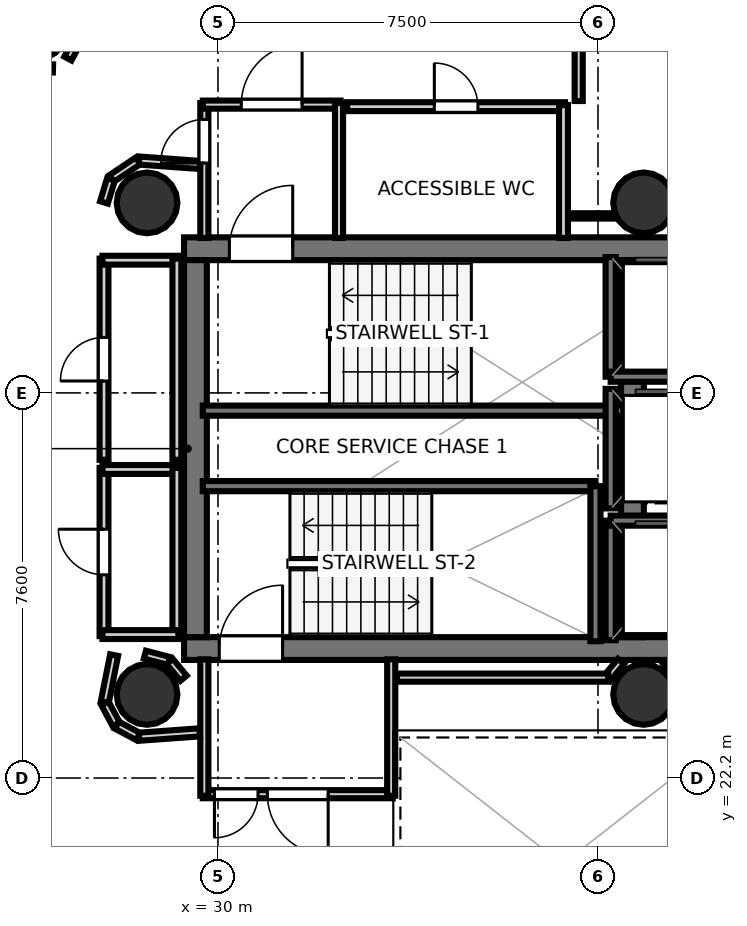
"""IFC4 building model, lengths in metres.
Left out: names, types, materials, properties, quantities, classifications, styles, units other than length and angle.
Written with IfcOpenShell. Run it as: python <this file> out.ifc"""

import sys

from ifc_helpers import new_model, si_unit, direction, frame, frame_2d, origin, origin_2d, place, context, subcontext, project, spatial, rectangle, hollow_circle, extrude, element, fill, save


model = new_model("IFC4")
c1 = context("Model", 3, precision=1e-05, world=origin(), true_north=direction((0.0, 1.0)))
c2 = subcontext(c1, "Body", "Model", "MODEL_VIEW")
j1 = project(units=[si_unit("LENGTHUNIT", "METRE"), si_unit("PLANEANGLEUNIT", "RADIAN")], contexts=[c1])
p1 = place(None, origin())
s1 = spatial("IfcSite", under=j1, at=p1, CompositionType="ELEMENT")
p2 = place(p1, origin())
s2 = spatial("IfcBuilding", under=s1, at=p2, CompositionType="ELEMENT")
p3 = place(p2, frame((0.0, 0.0, 200.3)))
s3 = spatial("IfcBuildingStorey", under=s2, at=p3, CompositionType="ELEMENT", Elevation=200.3)
p4 = place(p3, frame((29.33, 32.645, 0.0), z_axis=(0.0, 0.0, 1.0), x_axis=(1.0, 0.0, 0.0)))
e1 = element("IfcWall", 1, at=p4, inside=s3, PredefinedType="SHEAR", context=c2, shape_type="SweptSolid", body=[
    extrude(rectangle(XDim=10.52, YDim=0.45, at=frame_2d((5.26, 0.0))), origin(), (0.0, 0.0, 1.0), 3.52),
])
p5 = place(p4, frame((0.895, 0.0, 0.0)))
e2 = element("IfcOpeningElement", 2, at=p5, cuts=e1, PredefinedType="OPENING", context=c2, shape_type="SweptSolid", body=[
    extrude(rectangle(XDim=1.25, YDim=2.15, at=frame_2d((0.625, 1.075))), frame((0.0, 0.235, 0.0), z_axis=(0.0, -1.0, 0.0), x_axis=(1.0, 0.0, 0.0)), (0.0, 0.0, 1.0), 0.47),
])
p6 = place(p3, frame((29.33, 24.755, 0.0), z_axis=(0.0, 0.0, 1.0), x_axis=(1.0, 0.0, 0.0)))
e3 = element("IfcWall", 3, at=p6, inside=s3, PredefinedType="SHEAR", context=c2, shape_type="SweptSolid", body=[
    extrude(rectangle(XDim=10.52, YDim=0.45, at=frame_2d((5.26, 0.0))), origin(), (0.0, 0.0, 1.0), 3.52),
])
p7 = place(p6, frame((0.695, 0.0, 0.0)))
e4 = element("IfcOpeningElement", 4, at=p7, cuts=e3, PredefinedType="OPENING", context=c2, shape_type="SweptSolid", body=[
    extrude(rectangle(XDim=1.25, YDim=2.15, at=frame_2d((0.625, 1.075))), frame((0.0, 0.235, 0.0), z_axis=(0.0, -1.0, 0.0), x_axis=(1.0, 0.0, 0.0)), (0.0, 0.0, 1.0), 0.47),
])
for number, where, z_axis, x_axis in (
    (5, (29.555, 24.98, 0.0), (0.0, 0.0, 1.0), (0.0, 1.0, 0.0)),
    (6, (38.18, 24.98, 0.0), (0.0, 0.0, 1.0), (0.0, 1.0, 0.0)),
):
    element("IfcWall", number, at=place(p3, frame(where, z_axis=z_axis, x_axis=x_axis)), inside=s3, PredefinedType="SHEAR", context=c2, shape_type="SweptSolid", body=[
        extrude(rectangle(XDim=7.44, YDim=0.45, at=frame_2d((3.72, 0.0))), origin(), (0.0, 0.0, 1.0), 3.52),
    ])
for number, where, z_axis, x_axis in (
    (7, (28.6, 33.55, 0.0), (0.0, 0.0, 1.0), (1.0, 0.0, 0.0)),
    (8, (28.6, 23.85, 0.0), (0.0, 0.0, 1.0), (1.0, 0.0, 0.0)),
    (9, (38.4, 33.55, 0.0), (0.0, 0.0, 1.0), (1.0, 0.0, 0.0)),
    (10, (38.4, 23.85, 0.0), (0.0, 0.0, 1.0), (1.0, 0.0, 0.0)),
    (11, (26.431, 36.992, 0.0), (0.0, 0.0, 1.0), (1.0, 0.0, 0.0)),
):
    element("IfcColumn", number, at=place(p3, frame(where, z_axis=z_axis, x_axis=x_axis)), inside=s3, PredefinedType="COLUMN", context=c2, shape_type="SweptSolid", body=[
        extrude(hollow_circle(Radius=0.6, WallThickness=0.03, at=origin_2d()), origin(), (0.0, 0.0, 1.0), 3.7),
    ])
p8 = place(p3, frame((29.7, 29.45, 0.0), z_axis=(0.0, 0.0, 1.0), x_axis=(1.0, 0.0, 0.0)))
e12 = element("IfcWall", 12, at=p8, inside=s3, PredefinedType="SOLIDWALL", context=c2, shape_type="SweptSolid", body=[
    extrude(rectangle(XDim=8.3, YDim=0.2, at=frame_2d((4.15, 0.0))), origin(), (0.0, 0.0, 1.0), 3.52),
])
p9 = place(p3, frame((29.7, 27.96, 0.0), z_axis=(0.0, 0.0, 1.0), x_axis=(1.0, 0.0, 0.0)))
e13 = element("IfcWall", 13, at=p9, inside=s3, PredefinedType="SOLIDWALL", context=c2, shape_type="SweptSolid", body=[
    extrude(rectangle(XDim=7.75, YDim=0.2, at=frame_2d((3.875, 0.0))), origin(), (0.0, 0.0, 1.0), 3.52),
])
p10 = place(p3, frame((37.45, 24.9, 0.0), z_axis=(0.0, 0.0, 1.0), x_axis=(0.0, 1.0, 0.0)))
e14 = element("IfcWall", 14, at=p10, inside=s3, PredefinedType="SOLIDWALL", context=c2, shape_type="SweptSolid", body=[
    extrude(rectangle(XDim=3.06, YDim=0.2, at=frame_2d((1.53, 0.0))), origin(), (0.0, 0.0, 1.0), 3.52),
])
p11 = place(p3, frame((37.75, 30.12, 0.0), z_axis=(0.0, 0.0, 1.0), x_axis=(0.0, 1.0, 0.0)))
e15 = element("IfcWall", 15, at=p11, inside=s3, PredefinedType="SOLIDWALL", context=c2, shape_type="SweptSolid", body=[
    extrude(rectangle(XDim=2.36, YDim=0.2, at=frame_2d((1.18, 0.0))), origin(), (0.0, 0.0, 1.0), 3.52),
])
p12 = place(p3, frame((37.75, 30.12, 0.0), z_axis=(0.0, 0.0, 1.0), x_axis=(1.0, 0.0, 0.0)))
e16 = element("IfcWall", 16, at=p12, inside=s3, PredefinedType="SOLIDWALL", context=c2, shape_type="SweptSolid", body=[
    extrude(rectangle(XDim=2.1, YDim=0.2, at=frame_2d((1.05, 0.0))), origin(), (0.0, 0.0, 1.0), 3.52),
])
p13 = place(p3, frame((37.75, 24.92, 0.0), z_axis=(0.0, 0.0, 1.0), x_axis=(0.0, 1.0, 0.0)))
e17 = element("IfcWall", 17, at=p13, inside=s3, PredefinedType="SOLIDWALL", context=c2, shape_type="SweptSolid", body=[
    extrude(rectangle(XDim=2.36, YDim=0.2, at=frame_2d((1.18, 0.0))), origin(), (0.0, 0.0, 1.0), 3.52),
])
p14 = place(p3, frame((37.75, 27.28, 0.0), z_axis=(0.0, 0.0, 1.0), x_axis=(1.0, 0.0, 0.0)))
e18 = element("IfcWall", 18, at=p14, inside=s3, PredefinedType="SOLIDWALL", context=c2, shape_type="SweptSolid", body=[
    extrude(rectangle(XDim=2.1, YDim=0.2, at=frame_2d((1.05, 0.0))), origin(), (0.0, 0.0, 1.0), 3.52),
])
p15 = place(p3, frame((37.75, 27.52, 0.0), z_axis=(0.0, 0.0, 1.0), x_axis=(0.0, 1.0, 0.0)))
e19 = element("IfcWall", 19, at=p15, inside=s3, PredefinedType="SOLIDWALL", context=c2, shape_type="SweptSolid", body=[
    extrude(rectangle(XDim=2.36, YDim=0.2, at=frame_2d((1.18, 0.0))), origin(), (0.0, 0.0, 1.0), 3.52),
])
p16 = place(p3, frame((29.731, 32.858, 0.0), z_axis=(0.0, 0.0, 1.0), x_axis=(0.0, 1.0, 0.0)))
e20 = element("IfcWall", 20, at=p16, inside=s3, PredefinedType="PARTITIONING", context=c2, shape_type="SweptSolid", body=[
    extrude(rectangle(XDim=2.662, YDim=0.16, at=frame_2d((1.331, 0.0))), origin(), (0.0, 0.0, 1.0), 2.84),
])
p17 = place(p16, frame((1.478, 0.0, 0.0)))
e21 = element("IfcOpeningElement", 21, at=p17, cuts=e20, PredefinedType="OPENING", context=c2, shape_type="SweptSolid", body=[
    extrude(rectangle(XDim=0.86, YDim=2.05, at=frame_2d((0.43, 1.025))), frame((0.0, 0.09, 0.0), z_axis=(0.0, -1.0, 0.0), x_axis=(1.0, 0.0, 0.0)), (0.0, 0.0, 1.0), 0.18),
])
p18 = place(p3, frame((29.7, 35.489, 0.0), z_axis=(0.0, 0.0, 1.0), x_axis=(1.0, 0.0, 0.0)))
e22 = element("IfcWall", 22, at=p18, inside=s3, PredefinedType="PARTITIONING", context=c2, shape_type="SweptSolid", body=[
    extrude(rectangle(XDim=2.72, YDim=0.16, at=frame_2d((1.36, 0.0))), origin(), (0.0, 0.0, 1.0), 2.84),
])
p19 = place(p18, frame((0.76, 0.0, 0.0)))
e23 = element("IfcOpeningElement", 23, at=p19, cuts=e22, PredefinedType="OPENING", context=c2, shape_type="SweptSolid", body=[
    extrude(rectangle(XDim=1.2, YDim=2.15, at=frame_2d((0.6, 1.075))), frame((0.0, 0.09, 0.0), z_axis=(0.0, -1.0, 0.0), x_axis=(1.0, 0.0, 0.0)), (0.0, 0.0, 1.0), 0.18),
])
p20 = place(p3, frame((32.389, 35.52, 0.0), z_axis=(0.0, 0.0, 1.0), x_axis=(0.0, -1.0, 0.0)))
e24 = element("IfcWall", 24, at=p20, inside=s3, PredefinedType="PARTITIONING", context=c2, shape_type="SweptSolid", body=[
    extrude(rectangle(XDim=2.662, YDim=0.16, at=frame_2d((1.331, 0.0))), origin(), (0.0, 0.0, 1.0), 2.84),
])
p21 = place(p3, frame((33.45, 21.881, 0.0), z_axis=(0.0, 0.0, 1.0), x_axis=(-1.0, 0.0, 0.0)))
e25 = element("IfcWall", 25, at=p21, inside=s3, PredefinedType="PARTITIONING", context=c2, shape_type="SweptSolid", body=[
    extrude(rectangle(XDim=3.75, YDim=0.16, at=frame_2d((1.875, 0.0))), origin(), (0.0, 0.0, 1.0), 2.84),
])
p22 = place(p21, frame((1.275, 0.0, 0.0)))
e26 = element("IfcOpeningElement", 26, at=p22, cuts=e25, PredefinedType="OPENING", context=c2, shape_type="SweptSolid", body=[
    extrude(rectangle(XDim=1.2, YDim=2.15, at=frame_2d((0.6, 1.075))), frame((0.0, 0.09, 0.0), z_axis=(0.0, -1.0, 0.0), x_axis=(1.0, 0.0, 0.0)), (0.0, 0.0, 1.0), 0.18),
])
p23 = place(p21, frame((2.66, 0.0, 0.0)))
e27 = element("IfcOpeningElement", 27, at=p23, cuts=e25, PredefinedType="OPENING", context=c2, shape_type="SweptSolid", body=[
    extrude(rectangle(XDim=0.86, YDim=2.05, at=frame_2d((0.43, 1.025))), frame((0.0, 0.09, 0.0), z_axis=(0.0, -1.0, 0.0), x_axis=(1.0, 0.0, 0.0)), (0.0, 0.0, 1.0), 0.18),
])
for number, where, z_axis, x_axis in (
    (28, (29.731, 21.85, 0.0), (0.0, 0.0, 1.0), (0.0, 1.0, 0.0)),
    (29, (33.419, 24.542, 0.0), (0.0, 0.0, 1.0), (0.0, -1.0, 0.0)),
):
    element("IfcWall", number, at=place(p3, frame(where, z_axis=z_axis, x_axis=x_axis)), inside=s3, PredefinedType="PARTITIONING", context=c2, shape_type="SweptSolid", body=[
        extrude(rectangle(XDim=2.692, YDim=0.16, at=frame_2d((1.346, 0.0))), origin(), (0.0, 0.0, 1.0), 2.84),
    ])
p24 = place(p3, frame((32.55, 35.449, 0.0), z_axis=(0.0, 0.0, 1.0), x_axis=(1.0, 0.0, 0.0)))
e30 = element("IfcWall", 30, at=p24, inside=s3, PredefinedType="PLUMBINGWALL", context=c2, shape_type="SweptSolid", body=[
    extrude(rectangle(XDim=4.3, YDim=0.175, at=frame_2d((2.15, 0.0))), origin(), (0.0, 0.0, 1.0), 2.84),
])
p25 = place(p24, frame((1.72, 0.0, 0.0)))
e31 = element("IfcOpeningElement", 31, at=p25, cuts=e30, PredefinedType="OPENING", context=c2, shape_type="SweptSolid", body=[
    extrude(rectangle(XDim=0.86, YDim=2.05, at=frame_2d((0.43, 1.025))), frame((0.0, 0.097, 0.0), z_axis=(0.0, -1.0, 0.0), x_axis=(1.0, 0.0, 0.0)), (0.0, 0.0, 1.0), 0.195),
])
p26 = place(p3, frame((36.819, 35.48, 0.0), z_axis=(0.0, 0.0, 1.0), x_axis=(0.0, -1.0, 0.0)))
e32 = element("IfcWall", 32, at=p26, inside=s3, PredefinedType="PLUMBINGWALL", context=c2, shape_type="SweptSolid", body=[
    extrude(rectangle(XDim=2.622, YDim=0.175, at=frame_2d((1.311, 0.0))), origin(), (0.0, 0.0, 1.0), 2.84),
])
p27 = place(p3, frame((27.751, 25.0, 0.0), z_axis=(0.0, 0.0, 1.0), x_axis=(0.0, 1.0, 0.0)))
e33 = element("IfcWall", 33, at=p27, inside=s3, PredefinedType="PLUMBINGWALL", context=c2, shape_type="SweptSolid", body=[
    extrude(rectangle(XDim=3.32, YDim=0.175, at=frame_2d((1.66, 0.0))), origin(), (0.0, 0.0, 1.0), 2.84),
])
p28 = place(p27, frame((1.21, 0.0, 0.0)))
e34 = element("IfcOpeningElement", 34, at=p28, cuts=e33, PredefinedType="OPENING", context=c2, shape_type="SweptSolid", body=[
    extrude(rectangle(XDim=0.9, YDim=2.1, at=frame_2d((0.45, 1.05))), frame((0.0, 0.097, 0.0), z_axis=(0.0, -1.0, 0.0), x_axis=(1.0, 0.0, 0.0)), (0.0, 0.0, 1.0), 0.195),
])
p29 = place(p3, frame((27.72, 28.289, 0.0), z_axis=(0.0, 0.0, 1.0), x_axis=(1.0, 0.0, 0.0)))
e35 = element("IfcWall", 35, at=p29, inside=s3, PredefinedType="PLUMBINGWALL", context=c2, shape_type="SweptSolid", body=[
    extrude(rectangle(XDim=1.5, YDim=0.175, at=frame_2d((0.75, 0.0))), origin(), (0.0, 0.0, 1.0), 2.84),
])
p30 = place(p3, frame((29.189, 28.32, 0.0), z_axis=(0.0, 0.0, 1.0), x_axis=(0.0, -1.0, 0.0)))
e36 = element("IfcWall", 36, at=p30, inside=s3, PredefinedType="PLUMBINGWALL", context=c2, shape_type="SweptSolid", body=[
    extrude(rectangle(XDim=3.32, YDim=0.175, at=frame_2d((1.66, 0.0))), origin(), (0.0, 0.0, 1.0), 2.84),
])
p31 = place(p3, frame((29.22, 25.031, 0.0), z_axis=(0.0, 0.0, 1.0), x_axis=(-1.0, 0.0, 0.0)))
e37 = element("IfcWall", 37, at=p31, inside=s3, PredefinedType="PLUMBINGWALL", context=c2, shape_type="SweptSolid", body=[
    extrude(rectangle(XDim=1.5, YDim=0.175, at=frame_2d((0.75, 0.0))), origin(), (0.0, 0.0, 1.0), 2.84),
])
p32 = place(p3, frame((27.751, 28.48, 0.0), z_axis=(0.0, 0.0, 1.0), x_axis=(0.0, 1.0, 0.0)))
e38 = element("IfcWall", 38, at=p32, inside=s3, PredefinedType="PLUMBINGWALL", context=c2, shape_type="SweptSolid", body=[
    extrude(rectangle(XDim=3.97, YDim=0.175, at=frame_2d((1.985, 0.0))), origin(), (0.0, 0.0, 1.0), 2.84),
])
p33 = place(p32, frame((1.555, 0.0, 0.0)))
e39 = element("IfcOpeningElement", 39, at=p33, cuts=e38, PredefinedType="OPENING", context=c2, shape_type="SweptSolid", body=[
    extrude(rectangle(XDim=0.86, YDim=2.05, at=frame_2d((0.43, 1.025))), frame((0.0, 0.097, 0.0), z_axis=(0.0, -1.0, 0.0), x_axis=(1.0, 0.0, 0.0)), (0.0, 0.0, 1.0), 0.195),
])
p34 = place(p3, frame((27.72, 32.419, 0.0), z_axis=(0.0, 0.0, 1.0), x_axis=(1.0, 0.0, 0.0)))
e40 = element("IfcWall", 40, at=p34, inside=s3, PredefinedType="PLUMBINGWALL", context=c2, shape_type="SweptSolid", body=[
    extrude(rectangle(XDim=1.5, YDim=0.175, at=frame_2d((0.75, 0.0))), origin(), (0.0, 0.0, 1.0), 2.84),
])
p35 = place(p3, frame((29.189, 32.45, 0.0), z_axis=(0.0, 0.0, 1.0), x_axis=(0.0, -1.0, 0.0)))
e41 = element("IfcWall", 41, at=p35, inside=s3, PredefinedType="PLUMBINGWALL", context=c2, shape_type="SweptSolid", body=[
    extrude(rectangle(XDim=3.97, YDim=0.175, at=frame_2d((1.985, 0.0))), origin(), (0.0, 0.0, 1.0), 2.84),
])
p36 = place(p3, frame((29.321, 24.17, 0.0), z_axis=(0.0, 0.0, 1.0), x_axis=(-0.638008265708, 0.770029514296, 0.0)))
e42 = element("IfcWall", 42, at=p36, inside=s3, PredefinedType="PARTITIONING", context=c2, shape_type="SweptSolid", body=[
    extrude(rectangle(XDim=0.431, YDim=0.16, at=frame_2d((0.215, 0.0))), origin(), (0.0, 0.0, 1.0), 2.84),
])
p37 = place(p3, frame((29.03, 24.512, 0.0), z_axis=(0.0, 0.0, 1.0), x_axis=(-0.967681003213, 0.252177469296, 0.0)))
e43 = element("IfcWall", 43, at=p37, inside=s3, PredefinedType="PARTITIONING", context=c2, shape_type="SweptSolid", body=[
    extrude(rectangle(XDim=0.488, YDim=0.16, at=frame_2d((0.244, 0.0))), origin(), (0.0, 0.0, 1.0), 2.84),
])
for number, where, z_axis, x_axis in (
    (44, (39.121, 24.17, 0.0), (0.0, 0.0, 1.0), (-0.638, 0.77, 0.0)),
    (45, (37.954, 24.502, 0.0), (0.0, 0.0, 1.0), (-0.638, -0.77, 0.0)),
):
    element("IfcWall", number, at=place(p3, frame(where, z_axis=z_axis, x_axis=x_axis)), inside=s3, PredefinedType="PARTITIONING", context=c2, shape_type="SweptSolid", body=[
        extrude(rectangle(XDim=0.431, YDim=0.16, at=frame_2d((0.215, 0.0))), origin(), (0.0, 0.0, 1.0), 2.84),
    ])
p38 = place(p3, frame((37.703, 24.181, 0.0), z_axis=(0.0, 0.0, 1.0), x_axis=(-1.0, 0.0, 0.0)))
e46 = element("IfcWall", 46, at=p38, inside=s3, PredefinedType="PARTITIONING", context=c2, shape_type="SweptSolid", body=[
    extrude(rectangle(XDim=4.173, YDim=0.16, at=frame_2d((2.086, 0.0))), origin(), (0.0, 0.0, 1.0), 2.84),
])
p39 = place(p3, frame((37.119, 38.255, 0.0), z_axis=(0.0, 0.0, 1.0), x_axis=(0.0, -1.0, 0.0)))
e47 = element("IfcWall", 47, at=p39, inside=s3, PredefinedType="PARTITIONING", context=c2, shape_type="SweptSolid", body=[
    extrude(rectangle(XDim=2.695, YDim=0.16, at=frame_2d((1.348, 0.0))), origin(), (0.0, 0.0, 1.0), 2.84),
])
p40 = place(p3, frame((29.64, 34.299, 0.0), z_axis=(0.0, 0.0, 1.0), x_axis=(-0.997392224386, 0.072171675429, 0.0)))
e48 = element("IfcWall", 48, at=p40, inside=s3, PredefinedType="PARTITIONING", context=c2, shape_type="SweptSolid", body=[
    extrude(rectangle(XDim=1.201, YDim=0.16, at=frame_2d((0.601, 0.0))), origin(), (0.0, 0.0, 1.0), 2.84),
])
p41 = place(p3, frame((28.423, 34.38, 0.0), z_axis=(0.0, 0.0, 1.0), x_axis=(-0.831571279003, -0.555418047903, 0.0)))
e49 = element("IfcWall", 49, at=p41, inside=s3, PredefinedType="PARTITIONING", context=c2, shape_type="SweptSolid", body=[
    extrude(rectangle(XDim=0.628, YDim=0.16, at=frame_2d((0.314, 0.0))), origin(), (0.0, 0.0, 1.0), 2.84),
])
p42 = place(p3, frame((27.888, 34.015, 0.0), z_axis=(0.0, 0.0, 1.0), x_axis=(-0.290263585829, -0.956946733492, 0.0)))
e50 = element("IfcWall", 50, at=p42, inside=s3, PredefinedType="PARTITIONING", context=c2, shape_type="SweptSolid", body=[
    extrude(rectangle(XDim=0.476, YDim=0.16, at=frame_2d((0.238, 0.0))), origin(), (0.0, 0.0, 1.0), 2.84),
])
p43 = place(p3, frame((27.95, 24.626, 0.0), z_axis=(0.0, 0.0, 1.0), x_axis=(-0.195125950178, -0.980778192848, 0.0)))
e51 = element("IfcWall", 51, at=p43, inside=s3, PredefinedType="PARTITIONING", context=c2, shape_type="SweptSolid", body=[
    extrude(rectangle(XDim=0.948, YDim=0.16, at=frame_2d((0.474, 0.0))), origin(), (0.0, 0.0, 1.0), 2.84),
])
for number, where, z_axis, x_axis in (
    (52, (27.768, 23.675, 0.0), (0.0, 0.0, 1.0), (0.472, -0.882, 0.0)),
    (53, (28.006, 23.243, 0.0), (0.0, 0.0, 1.0), (0.882, -0.472, 0.0)),
):
    element("IfcWall", number, at=place(p3, frame(where, z_axis=z_axis, x_axis=x_axis)), inside=s3, PredefinedType="PARTITIONING", context=c2, shape_type="SweptSolid", body=[
        extrude(rectangle(XDim=0.476, YDim=0.16, at=frame_2d((0.238, 0.0))), origin(), (0.0, 0.0, 1.0), 2.84),
    ])
p44 = place(p3, frame((28.442, 23.015, 0.0), z_axis=(0.0, 0.0, 1.0), x_axis=(0.99740683837, 0.07196942943, 0.0)))
e54 = element("IfcWall", 54, at=p44, inside=s3, PredefinedType="PARTITIONING", context=c2, shape_type="SweptSolid", body=[
    extrude(rectangle(XDim=1.201, YDim=0.16, at=frame_2d((0.601, 0.0))), origin(), (0.0, 0.0, 1.0), 2.84),
])
p45 = place(p3, frame((25.449, 36.238, 0.0), z_axis=(0.0, 0.0, 1.0), x_axis=(0.999651698073, -0.026390955635, 0.0)))
e55 = element("IfcWall", 55, at=p45, inside=s3, PredefinedType="PARTITIONING", context=c2, shape_type="SweptSolid", body=[
    extrude(rectangle(XDim=1.295, YDim=0.16, at=frame_2d((0.647, 0.0))), origin(), (0.0, 0.0, 1.0), 2.84),
])
p46 = place(p3, frame((27.038, 36.398, 0.0), z_axis=(0.0, 0.0, 1.0), x_axis=(0.471865548338, 0.881670519123, 0.0)))
e56 = element("IfcWall", 56, at=p46, inside=s3, PredefinedType="PARTITIONING", context=c2, shape_type="SweptSolid", body=[
    extrude(rectangle(XDim=0.476, YDim=0.16, at=frame_2d((0.238, 0.0))), origin(), (0.0, 0.0, 1.0), 2.84),
])
p47 = place(p3, frame((39.8, 33.293, 0.0), z_axis=(0.0, 0.0, 1.0), x_axis=(-1.0, 0.0, 0.0)))
e57 = element("IfcWall", 57, at=p47, inside=s3, PredefinedType="PARTITIONING", context=c2, shape_type="SweptSolid", body=[
    extrude(rectangle(XDim=2.87, YDim=0.105, at=frame_2d((1.435, 0.0))), origin(), (0.0, 0.0, 1.0), 2.84),
])
p48 = place(p5, origin())
e58 = element("IfcDoor", 58, at=p48, inside=s3, OperationType="SINGLE_SWING_RIGHT", PredefinedType="DOOR", context=c2, shape_type="SweptSolid", body=[
    extrude(rectangle(XDim=1.25, YDim=2.15, at=frame_2d((0.625, 1.075))), frame((0.0, 0.025, 0.0), z_axis=(0.0, -1.0, 0.0), x_axis=(1.0, 0.0, 0.0)), (0.0, 0.0, 1.0), 0.05),
])
fill(e2, e58)
p49 = place(p7, origin())
e59 = element("IfcDoor", 59, at=p49, inside=s3, OperationType="SINGLE_SWING_RIGHT", PredefinedType="DOOR", context=c2, shape_type="SweptSolid", body=[
    extrude(rectangle(XDim=1.25, YDim=2.15, at=frame_2d((0.625, 1.075))), frame((0.0, 0.025, 0.0), z_axis=(0.0, -1.0, 0.0), x_axis=(1.0, 0.0, 0.0)), (0.0, 0.0, 1.0), 0.05),
])
fill(e4, e59)
p50 = place(p19, origin())
e60 = element("IfcDoor", 60, at=p50, inside=s3, OperationType="SINGLE_SWING_RIGHT", PredefinedType="DOOR", context=c2, shape_type="SweptSolid", body=[
    extrude(rectangle(XDim=1.2, YDim=2.15, at=frame_2d((0.6, 1.075))), frame((0.0, 0.025, 0.0), z_axis=(0.0, -1.0, 0.0), x_axis=(1.0, 0.0, 0.0)), (0.0, 0.0, 1.0), 0.05),
])
fill(e23, e60)
p51 = place(p22, origin())
e61 = element("IfcDoor", 61, at=p51, inside=s3, OperationType="SINGLE_SWING_LEFT", PredefinedType="DOOR", context=c2, shape_type="SweptSolid", body=[
    extrude(rectangle(XDim=1.2, YDim=2.15, at=frame_2d((0.6, 1.075))), frame((0.0, 0.025, 0.0), z_axis=(0.0, -1.0, 0.0), x_axis=(1.0, 0.0, 0.0)), (0.0, 0.0, 1.0), 0.05),
])
fill(e26, e61)
p52 = place(p25, origin())
e62 = element("IfcDoor", 62, at=p52, inside=s3, OperationType="SINGLE_SWING_LEFT", PredefinedType="DOOR", context=c2, shape_type="SweptSolid", body=[
    extrude(rectangle(XDim=0.86, YDim=2.05, at=frame_2d((0.43, 1.025))), frame((0.0, 0.025, 0.0), z_axis=(0.0, -1.0, 0.0), x_axis=(1.0, 0.0, 0.0)), (0.0, 0.0, 1.0), 0.05),
])
fill(e31, e62)
p53 = place(p28, origin())
e63 = element("IfcDoor", 63, at=p53, inside=s3, OperationType="SINGLE_SWING_RIGHT", PredefinedType="DOOR", context=c2, shape_type="SweptSolid", body=[
    extrude(rectangle(XDim=0.9, YDim=2.1, at=frame_2d((0.45, 1.05))), frame((0.0, 0.025, 0.0), z_axis=(0.0, -1.0, 0.0), x_axis=(1.0, 0.0, 0.0)), (0.0, 0.0, 1.0), 0.05),
])
fill(e34, e63)
p54 = place(p33, origin())
e64 = element("IfcDoor", 64, at=p54, inside=s3, OperationType="SINGLE_SWING_LEFT", PredefinedType="DOOR", context=c2, shape_type="SweptSolid", body=[
    extrude(rectangle(XDim=0.86, YDim=2.05, at=frame_2d((0.43, 1.025))), frame((0.0, 0.025, 0.0), z_axis=(0.0, -1.0, 0.0), x_axis=(1.0, 0.0, 0.0)), (0.0, 0.0, 1.0), 0.05),
])
fill(e39, e64)
p55 = place(p17, origin())
e65 = element("IfcDoor", 65, at=p55, inside=s3, OperationType="SINGLE_SWING_LEFT", PredefinedType="DOOR", context=c2, shape_type="SweptSolid", body=[
    extrude(rectangle(XDim=0.86, YDim=2.05, at=frame_2d((0.43, 1.025))), frame((0.0, 0.025, 0.0), z_axis=(0.0, -1.0, 0.0), x_axis=(1.0, 0.0, 0.0)), (0.0, 0.0, 1.0), 0.05),
])
fill(e21, e65)
p56 = place(p23, origin())
e66 = element("IfcDoor", 66, at=p56, inside=s3, OperationType="SINGLE_SWING_RIGHT", PredefinedType="DOOR", context=c2, shape_type="SweptSolid", body=[
    extrude(rectangle(XDim=0.86, YDim=2.05, at=frame_2d((0.43, 1.025))), frame((0.0, 0.025, 0.0), z_axis=(0.0, -1.0, 0.0), x_axis=(1.0, 0.0, 0.0)), (0.0, 0.0, 1.0), 0.05),
])
fill(e27, e66)
save(model, sys.argv[1])
